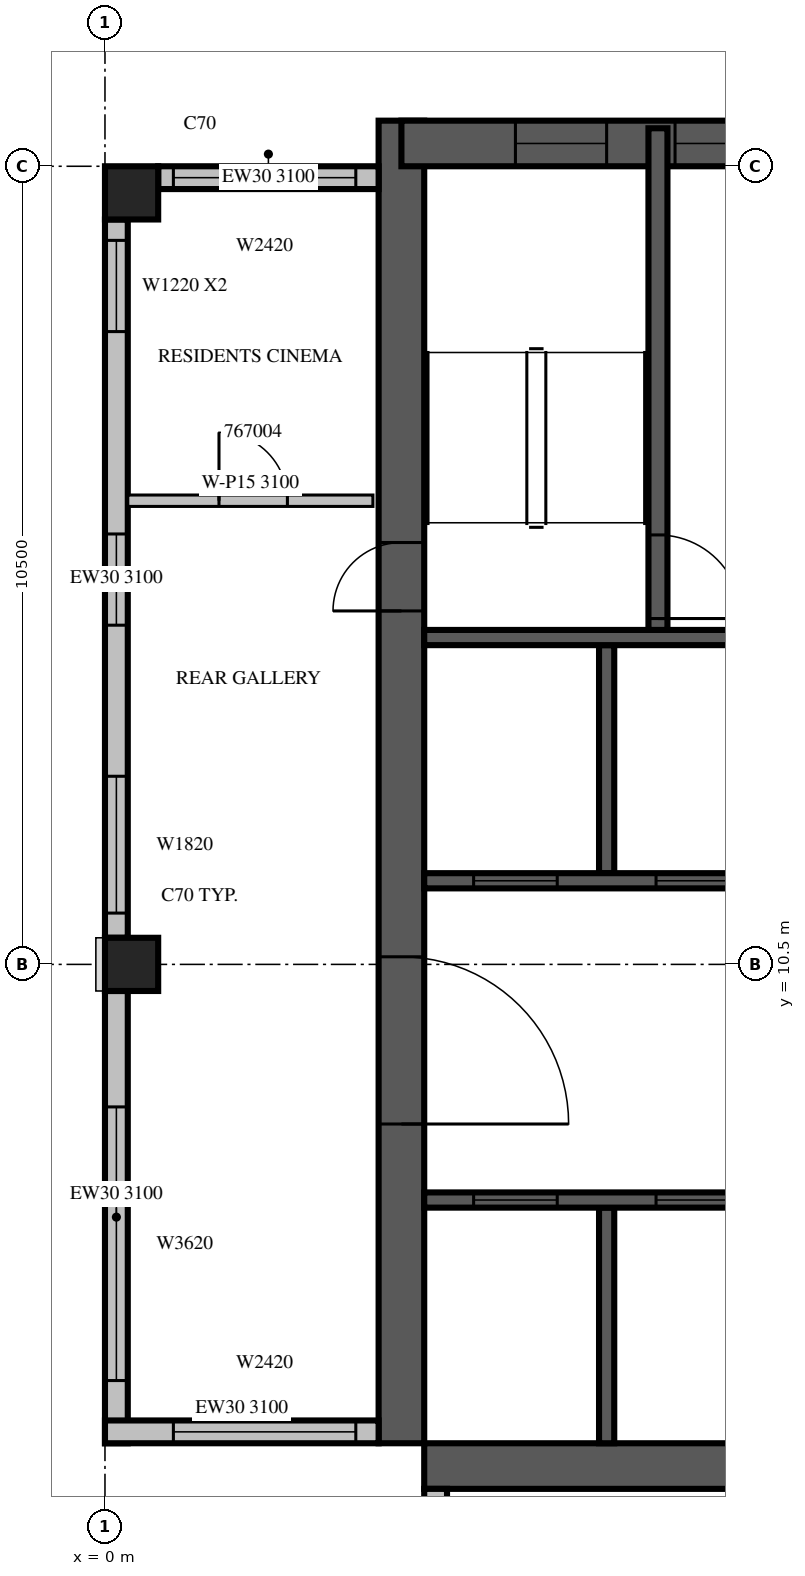
"""IFC4 building model, lengths in metres.
Left out: names, types, materials, properties, quantities, classifications, styles, units other than length and angle.
Written with IfcOpenShell. Run it as: python <this file> out.ifc"""

import sys

from ifc_helpers import new_model, si_unit, direction, frame, frame_2d, origin, origin_2d, place, context, subcontext, project, spatial, rectangle, extrude, source, transform, mapped, element, fill, save


model = new_model("IFC4")
c1 = context("Model", 3, precision=1e-05, world=origin(), true_north=direction((0.0, 1.0)))
c2 = subcontext(c1, "Body", "Model", "MODEL_VIEW")
j1 = project(units=[si_unit("LENGTHUNIT", "METRE"), si_unit("PLANEANGLEUNIT", "RADIAN")], contexts=[c1])
p1 = place(None, origin())
s1 = spatial("IfcSite", under=j1, at=p1, CompositionType="ELEMENT")
p2 = place(p1, origin())
s2 = spatial("IfcBuilding", under=s1, at=p2, CompositionType="ELEMENT")
p3 = place(p2, frame((0.0, 0.0, 295.0)))
s3 = spatial("IfcBuildingStorey", under=s2, at=p3, CompositionType="ELEMENT", Elevation=295.0)
m1 = source(origin(), c2, "Body", "SweptSolid", [
    extrude(rectangle(XDim=0.7, YDim=0.7, at=origin_2d()), origin(), (0.0, 0.0, 1.0), 3.5),
])
for number, where, z_axis, x_axis in (
    (1, (0.35, 10.5, 0.0), (0.0, 0.0, 1.0), (1.0, 0.0, 0.0)),
    (2, (0.35, 20.65, 0.0), (0.0, 0.0, 1.0), (1.0, 0.0, 0.0)),
):
    element("IfcColumn", number, at=place(p3, frame(where, z_axis=z_axis, x_axis=x_axis)), inside=s3, PredefinedType="COLUMN", context=c2, shape_type="MappedRepresentation", body=[
        mapped(m1, transform((0.0, 0.0, 0.0), scale=1.0)),
    ])
m2 = source(origin(), c2, "Body", "SweptSolid", [
    extrude(rectangle(XDim=17.4, YDim=0.6, at=frame_2d((8.7, 0.0))), origin(), (0.0, 0.0, 1.0), 3.5),
])
p4 = place(p3, frame((3.9, 4.2, 0.0), z_axis=(0.0, 0.0, 1.0), x_axis=(0.0, 1.0, 0.0)))
e3 = element("IfcWall", 3, at=p4, inside=s3, PredefinedType="SHEAR", context=c2, shape_type="MappedRepresentation", body=[
    mapped(m2, transform((0.0, 0.0, 0.0), scale=1.0)),
])
m3 = source(origin(), c2, "Body", "SweptSolid", [
    extrude(rectangle(XDim=2.2, YDim=2.1, at=frame_2d((1.1, 1.05))), frame((0.0, 0.31, 0.0), z_axis=(0.0, -1.0, 0.0), x_axis=(1.0, 0.0, 0.0)), (0.0, 0.0, 1.0), 0.62),
])
p5 = place(p4, frame((4.2, 0.0, 0.0)))
e4 = element("IfcOpeningElement", 4, at=p5, cuts=e3, PredefinedType="OPENING", context=c2, shape_type="MappedRepresentation", body=[
    mapped(m3, transform((0.0, 0.0, 0.0), scale=1.0)),
])
m4 = source(origin(), c2, "Body", "SweptSolid", [
    extrude(rectangle(XDim=0.9, YDim=2.1, at=frame_2d((0.45, 1.05))), frame((0.0, 0.31, 0.0), z_axis=(0.0, -1.0, 0.0), x_axis=(1.0, 0.0, 0.0)), (0.0, 0.0, 1.0), 0.62),
])
p6 = place(p4, frame((10.95, 0.0, 0.0)))
e5 = element("IfcOpeningElement", 5, at=p6, cuts=e3, PredefinedType="OPENING", context=c2, shape_type="MappedRepresentation", body=[
    mapped(m4, transform((0.0, 0.0, 0.0), scale=1.0)),
])
p7 = place(p3, frame((4.2, 3.9, 0.0), z_axis=(0.0, 0.0, 1.0), x_axis=(1.0, 0.0, 0.0)))
e6 = element("IfcWall", 6, at=p7, inside=s3, PredefinedType="SHEAR", context=c2, shape_type="MappedRepresentation", body=[
    mapped(m2, transform((0.0, 0.0, 0.0), scale=1.0)),
])
p8 = place(p7, frame((15.2, 0.0, 0.0)))
e7 = element("IfcOpeningElement", 7, at=p8, cuts=e6, PredefinedType="OPENING", context=c2, shape_type="MappedRepresentation", body=[
    mapped(m4, transform((0.0, 0.0, 0.0), scale=1.0)),
])
m5 = source(origin(), c2, "Body", "SweptSolid", [
    extrude(rectangle(XDim=6.6, YDim=0.6, at=frame_2d((3.3, 0.0))), origin(), (0.0, 0.0, 1.0), 3.5),
])
p9 = place(p3, frame((3.9, 21.3, 0.0), z_axis=(0.0, 0.0, 1.0), x_axis=(1.0, 0.0, 0.0)))
e8 = element("IfcWall", 8, at=p9, inside=s3, PredefinedType="SHEAR", context=c2, shape_type="MappedRepresentation", body=[
    mapped(m5, transform((0.0, 0.0, 0.0), scale=1.0)),
])
m6 = source(origin(), c2, "Body", "SweptSolid", [
    extrude(rectangle(XDim=1.2, YDim=2.4, at=frame_2d((0.6, 1.2))), frame((0.0, 0.31, 0.0), z_axis=(0.0, -1.0, 0.0), x_axis=(1.0, 0.0, 0.0)), (0.0, 0.0, 1.0), 0.62),
])
p10 = place(p9, frame((1.5, 0.0, 0.6)))
e9 = element("IfcOpeningElement", 9, at=p10, cuts=e8, PredefinedType="OPENING", context=c2, shape_type="MappedRepresentation", body=[
    mapped(m6, transform((0.0, 0.0, 0.0), scale=1.0)),
])
p11 = place(p9, frame((3.6, 0.0, 0.6)))
e10 = element("IfcOpeningElement", 10, at=p11, cuts=e8, PredefinedType="OPENING", context=c2, shape_type="MappedRepresentation", body=[
    mapped(m6, transform((0.0, 0.0, 0.0), scale=1.0)),
])
m7 = source(origin(), c2, "Body", "SweptSolid", [
    extrude(rectangle(XDim=2.9, YDim=0.3, at=frame_2d((1.45, 0.0))), origin(), (0.0, 0.0, 1.0), 3.1),
])
p12 = place(p3, frame((3.6, 20.85, 0.0), z_axis=(0.0, 0.0, 1.0), x_axis=(-1.0, 0.0, 0.0)))
e11 = element("IfcWall", 11, at=p12, inside=s3, PredefinedType="STANDARD", context=c2, shape_type="MappedRepresentation", body=[
    mapped(m7, transform((0.0, 0.0, 0.0), scale=1.0)),
])
m8 = source(origin(), c2, "Body", "SweptSolid", [
    extrude(rectangle(XDim=2.4, YDim=2.0, at=frame_2d((1.2, 1.0))), frame((0.0, 0.16, 0.0), z_axis=(0.0, -1.0, 0.0), x_axis=(1.0, 0.0, 0.0)), (0.0, 0.0, 1.0), 0.32),
])
p13 = place(p12, frame((0.3, 0.0, 0.6)))
e12 = element("IfcOpeningElement", 12, at=p13, cuts=e11, PredefinedType="OPENING", context=c2, shape_type="MappedRepresentation", body=[
    mapped(m8, transform((0.0, 0.0, 0.0), scale=1.0)),
])
m9 = source(origin(), c2, "Body", "SweptSolid", [
    extrude(rectangle(XDim=9.45, YDim=0.3, at=frame_2d((4.725, 0.0))), origin(), (0.0, 0.0, 1.0), 3.1),
])
p14 = place(p3, frame((0.15, 20.3, 0.0), z_axis=(0.0, 0.0, 1.0), x_axis=(0.0, -1.0, 0.0)))
e13 = element("IfcWall", 13, at=p14, inside=s3, PredefinedType="STANDARD", context=c2, shape_type="MappedRepresentation", body=[
    mapped(m9, transform((0.0, 0.0, 0.0), scale=1.0)),
])
m10 = source(origin(), c2, "Body", "SweptSolid", [
    extrude(rectangle(XDim=1.2, YDim=2.0, at=frame_2d((0.6, 1.0))), frame((0.0, 0.16, 0.0), z_axis=(0.0, -1.0, 0.0), x_axis=(1.0, 0.0, 0.0)), (0.0, 0.0, 1.0), 0.32),
])
p15 = place(p14, frame((0.275, 0.0, 0.6)))
e14 = element("IfcOpeningElement", 14, at=p15, cuts=e13, PredefinedType="OPENING", context=c2, shape_type="MappedRepresentation", body=[
    mapped(m10, transform((0.0, 0.0, 0.0), scale=1.0)),
])
m11 = source(origin(), c2, "Body", "SweptSolid", [
    extrude(rectangle(XDim=1.8, YDim=2.0, at=frame_2d((0.9, 1.0))), frame((0.0, 0.16, 0.0), z_axis=(0.0, -1.0, 0.0), x_axis=(1.0, 0.0, 0.0)), (0.0, 0.0, 1.0), 0.32),
])
p16 = place(p14, frame((7.325, 0.0, 0.6)))
e15 = element("IfcOpeningElement", 15, at=p16, cuts=e13, PredefinedType="OPENING", context=c2, shape_type="MappedRepresentation", body=[
    mapped(m11, transform((0.0, 0.0, 0.0), scale=1.0)),
])
p17 = place(p14, frame((4.138, 0.0, 0.6)))
e16 = element("IfcOpeningElement", 16, at=p17, cuts=e13, PredefinedType="OPENING", context=c2, shape_type="MappedRepresentation", body=[
    mapped(m10, transform((0.0, 0.0, 0.0), scale=1.0)),
])
m12 = source(origin(), c2, "Body", "SweptSolid", [
    extrude(rectangle(XDim=5.95, YDim=0.3, at=frame_2d((2.975, 0.0))), origin(), (0.0, 0.0, 1.0), 3.1),
])
p18 = place(p3, frame((0.15, 10.15, 0.0), z_axis=(0.0, 0.0, 1.0), x_axis=(0.0, -1.0, 0.0)))
e17 = element("IfcWall", 17, at=p18, inside=s3, PredefinedType="STANDARD", context=c2, shape_type="MappedRepresentation", body=[
    mapped(m12, transform((0.0, 0.0, 0.0), scale=1.0)),
])
m13 = source(origin(), c2, "Body", "SweptSolid", [
    extrude(rectangle(XDim=3.6, YDim=2.0, at=frame_2d((1.8, 1.0))), frame((0.0, 0.16, 0.0), z_axis=(0.0, -1.0, 0.0), x_axis=(1.0, 0.0, 0.0)), (0.0, 0.0, 1.0), 0.32),
])
p19 = place(p18, frame((1.525, 0.0, 0.6)))
e18 = element("IfcOpeningElement", 18, at=p19, cuts=e17, PredefinedType="OPENING", context=c2, shape_type="MappedRepresentation", body=[
    mapped(m13, transform((0.0, 0.0, 0.0), scale=1.0)),
])
m14 = source(origin(), c2, "Body", "SweptSolid", [
    extrude(rectangle(XDim=3.6, YDim=0.3, at=frame_2d((1.8, 0.0))), origin(), (0.0, 0.0, 1.0), 3.1),
])
p20 = place(p3, frame((0.0, 4.35, 0.0), z_axis=(0.0, 0.0, 1.0), x_axis=(1.0, 0.0, 0.0)))
e19 = element("IfcWall", 19, at=p20, inside=s3, PredefinedType="STANDARD", context=c2, shape_type="MappedRepresentation", body=[
    mapped(m14, transform((0.0, 0.0, 0.0), scale=1.0)),
])
p21 = place(p20, frame((0.9, 0.0, 0.6)))
e20 = element("IfcOpeningElement", 20, at=p21, cuts=e19, PredefinedType="OPENING", context=c2, shape_type="MappedRepresentation", body=[
    mapped(m8, transform((0.0, 0.0, 0.0), scale=1.0)),
])
p22 = place(p3, frame((4.35, 3.6, 0.0), z_axis=(0.0, 0.0, 1.0), x_axis=(0.0, -1.0, 0.0)))
e21 = element("IfcWall", 21, at=p22, inside=s3, PredefinedType="STANDARD", context=c2, shape_type="MappedRepresentation", body=[
    mapped(m14, transform((0.0, 0.0, 0.0), scale=1.0)),
])
p23 = place(p22, frame((0.3, 0.0, 0.6)))
e22 = element("IfcOpeningElement", 22, at=p23, cuts=e21, PredefinedType="OPENING", context=c2, shape_type="MappedRepresentation", body=[
    mapped(m8, transform((0.0, 0.0, 0.0), scale=1.0)),
])
m15 = source(origin(), c2, "Body", "SweptSolid", [
    extrude(rectangle(XDim=3.1, YDim=0.2, at=frame_2d((1.55, 0.0))), origin(), (0.0, 0.0, 1.0), 3.5),
])
p24 = place(p3, frame((6.6, 4.2, 0.0), z_axis=(0.0, 0.0, 1.0), x_axis=(0.0, 1.0, 0.0)))
e23 = element("IfcWall", 23, at=p24, inside=s3, PredefinedType="SOLIDWALL", context=c2, shape_type="MappedRepresentation", body=[
    mapped(m15, transform((0.0, 0.0, 0.0), scale=1.0)),
])
m16 = source(origin(), c2, "Body", "SweptSolid", [
    extrude(rectangle(XDim=3.0, YDim=0.2, at=frame_2d((1.5, 0.0))), origin(), (0.0, 0.0, 1.0), 3.5),
])
p25 = place(p3, frame((6.6, 11.7, 0.0), z_axis=(0.0, 0.0, 1.0), x_axis=(0.0, 1.0, 0.0)))
e24 = element("IfcWall", 24, at=p25, inside=s3, PredefinedType="SOLIDWALL", context=c2, shape_type="MappedRepresentation", body=[
    mapped(m16, transform((0.0, 0.0, 0.0), scale=1.0)),
])
m17 = source(origin(), c2, "Body", "SweptSolid", [
    extrude(rectangle(XDim=9.6, YDim=0.2, at=frame_2d((4.8, 0.0))), origin(), (0.0, 0.0, 1.0), 3.5),
])
p26 = place(p3, frame((4.2, 7.4, 0.0), z_axis=(0.0, 0.0, 1.0), x_axis=(1.0, 0.0, 0.0)))
e25 = element("IfcWall", 25, at=p26, inside=s3, PredefinedType="SOLIDWALL", context=c2, shape_type="MappedRepresentation", body=[
    mapped(m17, transform((0.0, 0.0, 0.0), scale=1.0)),
])
m18 = source(origin(), c2, "Body", "SweptSolid", [
    extrude(rectangle(XDim=1.1, YDim=2.1, at=frame_2d((0.55, 1.05))), frame((0.0, 0.11, 0.0), z_axis=(0.0, -1.0, 0.0), x_axis=(1.0, 0.0, 0.0)), (0.0, 0.0, 1.0), 0.22),
])
p27 = place(p26, frame((0.65, 0.0, 0.0)))
e26 = element("IfcOpeningElement", 26, at=p27, cuts=e25, PredefinedType="OPENING", context=c2, shape_type="MappedRepresentation", body=[
    mapped(m18, transform((0.0, 0.0, 0.0), scale=1.0)),
])
p28 = place(p26, frame((3.05, 0.0, 0.0)))
e27 = element("IfcOpeningElement", 27, at=p28, cuts=e25, PredefinedType="OPENING", context=c2, shape_type="MappedRepresentation", body=[
    mapped(m18, transform((0.0, 0.0, 0.0), scale=1.0)),
])
p29 = place(p26, frame((5.45, 0.0, 0.0)))
e28 = element("IfcOpeningElement", 28, at=p29, cuts=e25, PredefinedType="OPENING", context=c2, shape_type="MappedRepresentation", body=[
    mapped(m18, transform((0.0, 0.0, 0.0), scale=1.0)),
])
p30 = place(p26, frame((7.85, 0.0, 0.0)))
e29 = element("IfcOpeningElement", 29, at=p30, cuts=e25, PredefinedType="OPENING", context=c2, shape_type="MappedRepresentation", body=[
    mapped(m18, transform((0.0, 0.0, 0.0), scale=1.0)),
])
m19 = source(origin(), c2, "Body", "SweptSolid", [
    extrude(rectangle(XDim=4.8, YDim=0.2, at=frame_2d((2.4, 0.0))), origin(), (0.0, 0.0, 1.0), 3.5),
])
p31 = place(p3, frame((4.2, 11.6, 0.0), z_axis=(0.0, 0.0, 1.0), x_axis=(1.0, 0.0, 0.0)))
e30 = element("IfcWall", 30, at=p31, inside=s3, PredefinedType="SOLIDWALL", context=c2, shape_type="MappedRepresentation", body=[
    mapped(m19, transform((0.0, 0.0, 0.0), scale=1.0)),
])
p32 = place(p31, frame((0.65, 0.0, 0.0)))
e31 = element("IfcOpeningElement", 31, at=p32, cuts=e30, PredefinedType="OPENING", context=c2, shape_type="MappedRepresentation", body=[
    mapped(m18, transform((0.0, 0.0, 0.0), scale=1.0)),
])
p33 = place(p31, frame((3.05, 0.0, 0.0)))
e32 = element("IfcOpeningElement", 32, at=p33, cuts=e30, PredefinedType="OPENING", context=c2, shape_type="MappedRepresentation", body=[
    mapped(m18, transform((0.0, 0.0, 0.0), scale=1.0)),
])
p34 = place(p3, frame((4.2, 14.8, 0.0), z_axis=(0.0, 0.0, 1.0), x_axis=(1.0, 0.0, 0.0)))
e33 = element("IfcWall", 33, at=p34, inside=s3, PredefinedType="SOLIDWALL", context=c2, shape_type="MappedRepresentation", body=[
    mapped(m19, transform((0.0, 0.0, 0.0), scale=1.0)),
])
m20 = source(origin(), c2, "Body", "SweptSolid", [
    extrude(rectangle(XDim=6.6, YDim=0.25, at=frame_2d((3.3, 0.0))), origin(), (0.0, 0.0, 1.0), 3.1),
])
p35 = place(p3, frame((7.275, 14.9, 0.0), z_axis=(0.0, 0.0, 1.0), x_axis=(0.0, 1.0, 0.0)))
e34 = element("IfcWall", 34, at=p35, inside=s3, PredefinedType="SOLIDWALL", context=c2, shape_type="MappedRepresentation", body=[
    mapped(m20, transform((0.0, 0.0, 0.0), scale=1.0)),
])
m21 = source(origin(), c2, "Body", "SweptSolid", [
    extrude(rectangle(XDim=1.1, YDim=2.1, at=frame_2d((0.55, 1.05))), frame((0.0, 0.135, 0.0), z_axis=(0.0, -1.0, 0.0), x_axis=(1.0, 0.0, 0.0)), (0.0, 0.0, 1.0), 0.27),
])
p36 = place(p35, frame((0.15, 0.0, 0.0)))
e35 = element("IfcOpeningElement", 35, at=p36, cuts=e34, PredefinedType="OPENING", context=c2, shape_type="MappedRepresentation", body=[
    mapped(m21, transform((0.0, 0.0, 0.0), scale=1.0)),
])
m22 = source(origin(), c2, "Body", "SweptSolid", [
    extrude(rectangle(XDim=3.225, YDim=0.15, at=frame_2d((1.613, 0.0))), origin(), (0.0, 0.0, 1.0), 3.1),
])
p37 = place(p3, frame((0.3, 16.6, 0.0), z_axis=(0.0, 0.0, 1.0), x_axis=(1.0, 0.0, 0.0)))
e36 = element("IfcWall", 36, at=p37, inside=s3, PredefinedType="PARTITIONING", context=c2, shape_type="MappedRepresentation", body=[
    mapped(m22, transform((0.0, 0.0, 0.0), scale=1.0)),
])
m23 = source(origin(), c2, "Body", "SweptSolid", [
    extrude(rectangle(XDim=0.9, YDim=2.1, at=frame_2d((0.45, 1.05))), frame((0.0, 0.085, 0.0), z_axis=(0.0, -1.0, 0.0), x_axis=(1.0, 0.0, 0.0)), (0.0, 0.0, 1.0), 0.17),
])
p38 = place(p37, frame((1.2, 0.0, 0.0)))
e37 = element("IfcOpeningElement", 37, at=p38, cuts=e36, PredefinedType="OPENING", context=c2, shape_type="MappedRepresentation", body=[
    mapped(m23, transform((0.0, 0.0, 0.0), scale=1.0)),
])
m24 = source(origin(), c2, "Body", "SweptSolid", [
    extrude(rectangle(XDim=2.4, YDim=2.0, at=frame_2d((1.2, 1.0))), frame((0.0, 0.03, 0.0), z_axis=(0.0, -1.0, 0.0), x_axis=(1.0, 0.0, 0.0)), (0.0, 0.0, 1.0), 0.06),
])
p39 = place(p13, origin())
e38 = element("IfcWindow", 38, at=p39, inside=s3, PartitioningType="SINGLE_PANEL", PredefinedType="WINDOW", context=c2, shape_type="MappedRepresentation", body=[
    mapped(m24, transform((0.0, 0.0, 0.0), scale=1.0)),
])
fill(e12, e38)
m25 = source(origin(), c2, "Body", "SweptSolid", [
    extrude(rectangle(XDim=1.2, YDim=2.0, at=frame_2d((0.6, 1.0))), frame((0.0, 0.03, 0.0), z_axis=(0.0, -1.0, 0.0), x_axis=(1.0, 0.0, 0.0)), (0.0, 0.0, 1.0), 0.06),
])
p40 = place(p15, origin())
e39 = element("IfcWindow", 39, at=p40, inside=s3, PartitioningType="SINGLE_PANEL", PredefinedType="WINDOW", context=c2, shape_type="MappedRepresentation", body=[
    mapped(m25, transform((0.0, 0.0, 0.0), scale=1.0)),
])
fill(e14, e39)
m26 = source(origin(), c2, "Body", "SweptSolid", [
    extrude(rectangle(XDim=1.8, YDim=2.0, at=frame_2d((0.9, 1.0))), frame((0.0, 0.03, 0.0), z_axis=(0.0, -1.0, 0.0), x_axis=(1.0, 0.0, 0.0)), (0.0, 0.0, 1.0), 0.06),
])
p41 = place(p16, origin())
e40 = element("IfcWindow", 40, at=p41, inside=s3, PartitioningType="SINGLE_PANEL", PredefinedType="WINDOW", context=c2, shape_type="MappedRepresentation", body=[
    mapped(m26, transform((0.0, 0.0, 0.0), scale=1.0)),
])
fill(e15, e40)
m27 = source(origin(), c2, "Body", "SweptSolid", [
    extrude(rectangle(XDim=3.6, YDim=2.0, at=frame_2d((1.8, 1.0))), frame((0.0, 0.03, 0.0), z_axis=(0.0, -1.0, 0.0), x_axis=(1.0, 0.0, 0.0)), (0.0, 0.0, 1.0), 0.06),
])
p42 = place(p19, origin())
e41 = element("IfcWindow", 41, at=p42, inside=s3, PartitioningType="SINGLE_PANEL", PredefinedType="WINDOW", context=c2, shape_type="MappedRepresentation", body=[
    mapped(m27, transform((0.0, 0.0, 0.0), scale=1.0)),
])
fill(e18, e41)
p43 = place(p17, origin())
e42 = element("IfcWindow", 42, at=p43, inside=s3, PartitioningType="SINGLE_PANEL", PredefinedType="WINDOW", context=c2, shape_type="MappedRepresentation", body=[
    mapped(m25, transform((0.0, 0.0, 0.0), scale=1.0)),
])
fill(e16, e42)
p44 = place(p21, origin())
e43 = element("IfcWindow", 43, at=p44, inside=s3, PartitioningType="SINGLE_PANEL", PredefinedType="WINDOW", context=c2, shape_type="MappedRepresentation", body=[
    mapped(m24, transform((0.0, 0.0, 0.0), scale=1.0)),
])
fill(e20, e43)
m28 = source(origin(), c2, "Body", "SweptSolid", [
    extrude(rectangle(XDim=1.1, YDim=2.1, at=frame_2d((0.55, 1.05))), frame((0.0, 0.025, 0.0), z_axis=(0.0, -1.0, 0.0), x_axis=(1.0, 0.0, 0.0)), (0.0, 0.0, 1.0), 0.05),
])
p45 = place(p27, origin())
e44 = element("IfcDoor", 44, at=p45, inside=s3, OperationType="SLIDING_TO_LEFT", PredefinedType="DOOR", context=c2, shape_type="MappedRepresentation", body=[
    mapped(m28, transform((0.0, 0.0, 0.0), scale=1.0)),
])
fill(e26, e44)
p46 = place(p28, origin())
e45 = element("IfcDoor", 45, at=p46, inside=s3, OperationType="SLIDING_TO_LEFT", PredefinedType="DOOR", context=c2, shape_type="MappedRepresentation", body=[
    mapped(m28, transform((0.0, 0.0, 0.0), scale=1.0)),
])
fill(e27, e45)
p47 = place(p32, origin())
e46 = element("IfcDoor", 46, at=p47, inside=s3, OperationType="SLIDING_TO_LEFT", PredefinedType="DOOR", context=c2, shape_type="MappedRepresentation", body=[
    mapped(m28, transform((0.0, 0.0, 0.0), scale=1.0)),
])
fill(e31, e46)
p48 = place(p33, origin())
e47 = element("IfcDoor", 47, at=p48, inside=s3, OperationType="SLIDING_TO_LEFT", PredefinedType="DOOR", context=c2, shape_type="MappedRepresentation", body=[
    mapped(m28, transform((0.0, 0.0, 0.0), scale=1.0)),
])
fill(e32, e47)
p49 = place(p36, origin())
e48 = element("IfcDoor", 48, at=p49, inside=s3, OperationType="SINGLE_SWING_RIGHT", PredefinedType="DOOR", context=c2, shape_type="MappedRepresentation", body=[
    mapped(m28, transform((0.0, 0.0, 0.0), scale=1.0)),
])
fill(e35, e48)
m29 = source(origin(), c2, "Body", "SweptSolid", [
    extrude(rectangle(XDim=2.2, YDim=2.1, at=frame_2d((1.1, 1.05))), frame((0.0, 0.025, 0.0), z_axis=(0.0, -1.0, 0.0), x_axis=(1.0, 0.0, 0.0)), (0.0, 0.0, 1.0), 0.05),
])
p50 = place(p5, origin())
e49 = element("IfcDoor", 49, at=p50, inside=s3, OperationType="DOUBLE_DOOR_SINGLE_SWING", PredefinedType="DOOR", context=c2, shape_type="MappedRepresentation", body=[
    mapped(m29, transform((0.0, 0.0, 0.0), scale=1.0)),
])
fill(e4, e49)
m30 = source(origin(), c2, "Body", "SweptSolid", [
    extrude(rectangle(XDim=0.9, YDim=2.1, at=frame_2d((0.45, 1.05))), frame((0.0, 0.025, 0.0), z_axis=(0.0, -1.0, 0.0), x_axis=(1.0, 0.0, 0.0)), (0.0, 0.0, 1.0), 0.05),
])
p51 = place(p6, origin())
e50 = element("IfcDoor", 50, at=p51, inside=s3, OperationType="SINGLE_SWING_LEFT", PredefinedType="DOOR", context=c2, shape_type="MappedRepresentation", body=[
    mapped(m30, transform((0.0, 0.0, 0.0), scale=1.0)),
])
fill(e5, e50)
m31 = source(origin(), c2, "Body", "SweptSolid", [
    extrude(rectangle(XDim=1.2, YDim=2.4, at=frame_2d((0.6, 1.2))), frame((0.0, 0.03, 0.0), z_axis=(0.0, -1.0, 0.0), x_axis=(1.0, 0.0, 0.0)), (0.0, 0.0, 1.0), 0.06),
])
p52 = place(p10, origin())
e51 = element("IfcWindow", 51, at=p52, inside=s3, PartitioningType="SINGLE_PANEL", PredefinedType="WINDOW", context=c2, shape_type="MappedRepresentation", body=[
    mapped(m31, transform((0.0, 0.0, 0.0), scale=1.0)),
])
fill(e9, e51)
p53 = place(p11, origin())
e52 = element("IfcWindow", 52, at=p53, inside=s3, PartitioningType="SINGLE_PANEL", PredefinedType="WINDOW", context=c2, shape_type="MappedRepresentation", body=[
    mapped(m31, transform((0.0, 0.0, 0.0), scale=1.0)),
])
fill(e10, e52)
p54 = place(p38, origin())
e53 = element("IfcDoor", 53, at=p54, inside=s3, OperationType="SINGLE_SWING_LEFT", PredefinedType="DOOR", context=c2, shape_type="MappedRepresentation", body=[
    mapped(m30, transform((0.0, 0.0, 0.0), scale=1.0)),
])
fill(e37, e53)
save(model, sys.argv[1])
